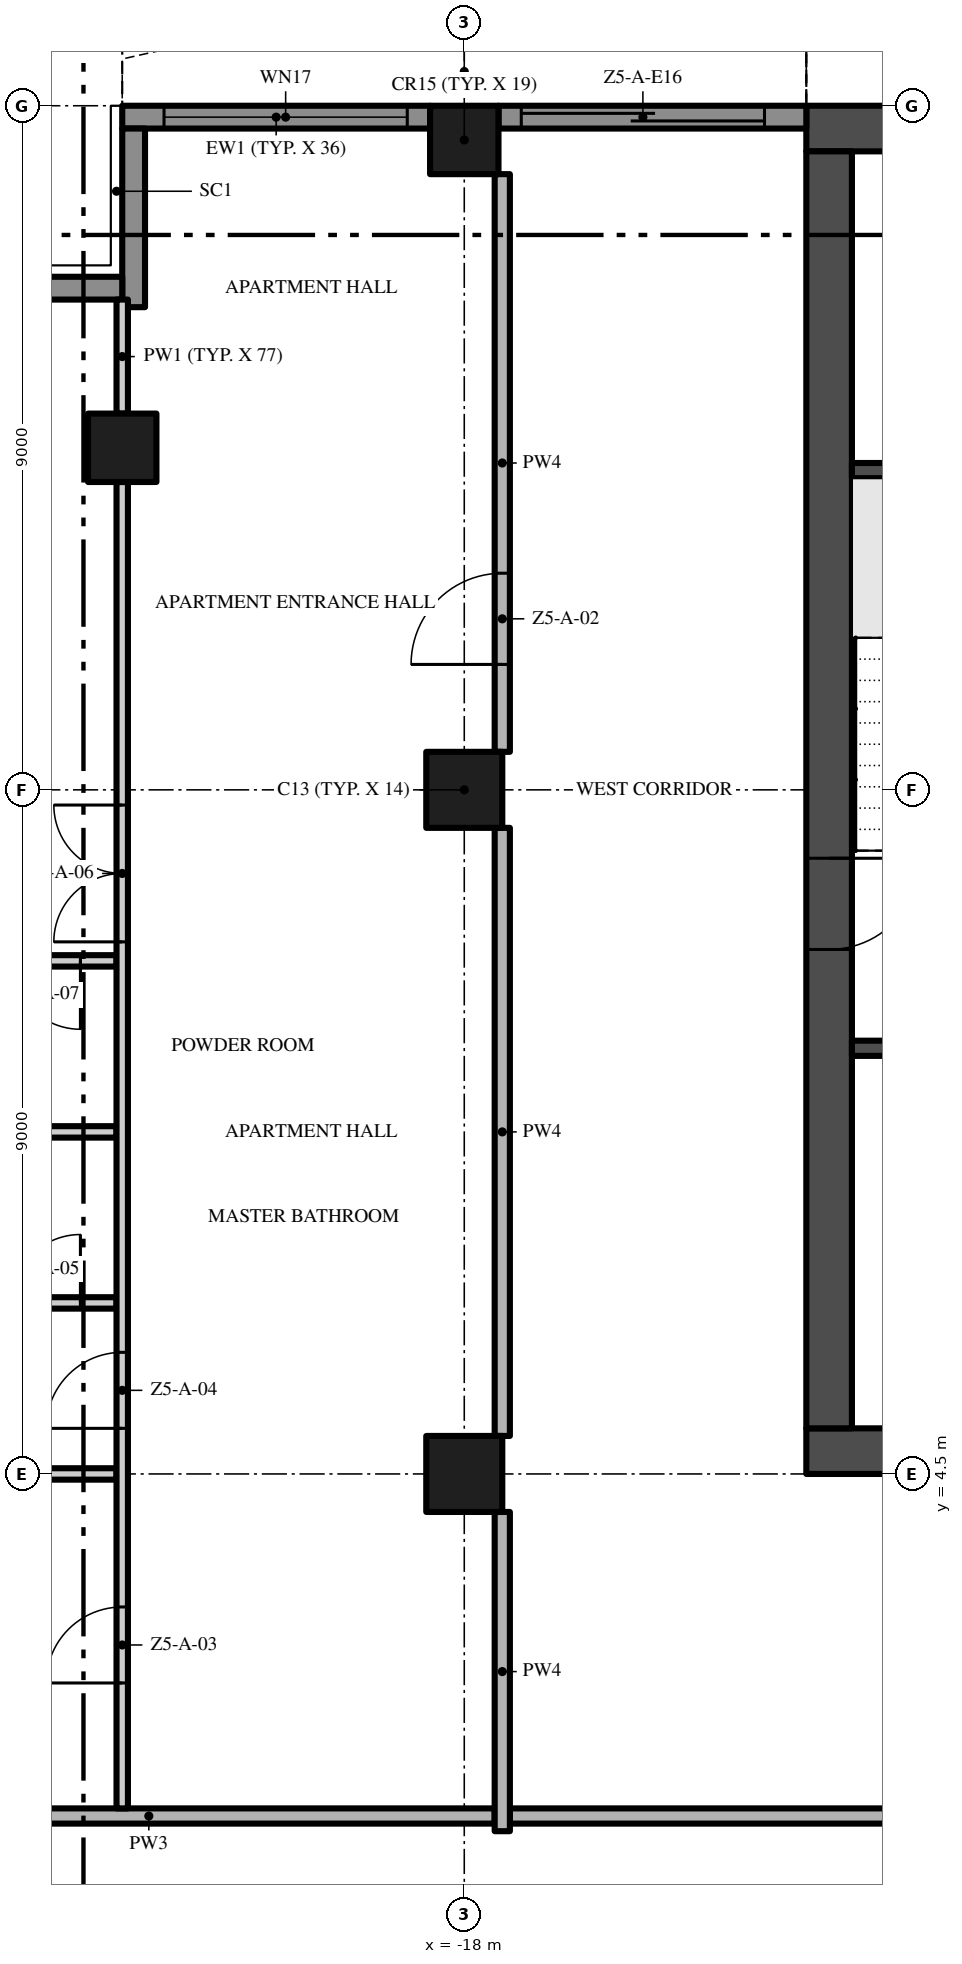
"""IFC4 building model, lengths in metres.
Left out: names, types, materials, properties, quantities, classifications, styles, units other than length and angle.
Written with IfcOpenShell. Run it as: python <this file> out.ifc"""

import sys

from ifc_helpers import new_model, si_unit, direction, frame, frame_2d, origin, origin_2d, place, context, subcontext, project, spatial, polyline, rectangle, outline, extrude, element, fill, save


model = new_model("IFC4")
c1 = context("Model", 3, precision=1e-05, world=origin(), true_north=direction((0.0, 1.0)))
c2 = subcontext(c1, "Body", "Model", "MODEL_VIEW")
j1 = project(units=[si_unit("LENGTHUNIT", "METRE"), si_unit("PLANEANGLEUNIT", "RADIAN")], contexts=[c1])
p1 = place(None, origin())
s1 = spatial("IfcSite", under=j1, at=p1, CompositionType="ELEMENT")
p2 = place(p1, origin())
s2 = spatial("IfcBuilding", under=s1, at=p2, CompositionType="ELEMENT")
p3 = place(p2, frame((0.0, 0.0, 246.4)))
s3 = spatial("IfcBuildingStorey", under=s2, at=p3, CompositionType="ELEMENT", Elevation=246.4)
p4 = place(p3, frame((-13.5, 4.8, -0.3), z_axis=(0.0, 0.0, 1.0), x_axis=(1.0, 0.0, 0.0)))
e1 = element("IfcWall", 1, at=p4, inside=s3, PredefinedType="SHEAR", context=c2, shape_type="SweptSolid", body=[
    extrude(rectangle(XDim=27.0, YDim=0.6, at=frame_2d((13.5, 0.0))), origin(), (0.0, 0.0, 1.0), 3.8),
])
p5 = place(p4, frame((12.0, 0.0, 0.3)))
e2 = element("IfcOpeningElement", 2, at=p5, cuts=e1, PredefinedType="OPENING", context=c2, shape_type="SweptSolid", body=[
    extrude(rectangle(XDim=3.0, YDim=2.4, at=frame_2d((1.5, 1.2))), frame((0.0, 0.31, 0.0), z_axis=(0.0, -1.0, 0.0), x_axis=(1.0, 0.0, 0.0)), (0.0, 0.0, 1.0), 0.62),
])
p6 = place(p4, frame((4.9, 0.0, 0.3)))
e3 = element("IfcOpeningElement", 3, at=p6, cuts=e1, PredefinedType="OPENING", context=c2, shape_type="SweptSolid", body=[
    extrude(rectangle(XDim=1.2, YDim=2.2, at=frame_2d((0.6, 1.1))), frame((0.0, 0.31, 0.0), z_axis=(0.0, -1.0, 0.0), x_axis=(1.0, 0.0, 0.0)), (0.0, 0.0, 1.0), 0.62),
])
p7 = place(p4, frame((20.75, 0.0, 0.3)))
e4 = element("IfcOpeningElement", 4, at=p7, cuts=e1, PredefinedType="OPENING", context=c2, shape_type="SweptSolid", body=[
    extrude(rectangle(XDim=1.5, YDim=2.2, at=frame_2d((0.75, 1.1))), frame((0.0, 0.31, 0.0), z_axis=(0.0, -1.0, 0.0), x_axis=(1.0, 0.0, 0.0)), (0.0, 0.0, 1.0), 0.62),
])
p8 = place(p4, frame((17.4, 0.0, 0.3)))
e5 = element("IfcOpeningElement", 5, at=p8, cuts=e1, PredefinedType="OPENING", context=c2, shape_type="SweptSolid", body=[
    extrude(rectangle(XDim=1.2, YDim=2.2, at=frame_2d((0.6, 1.1))), frame((0.0, 0.31, 0.0), z_axis=(0.0, -1.0, 0.0), x_axis=(1.0, 0.0, 0.0)), (0.0, 0.0, 1.0), 0.62),
])
p9 = place(p3, frame((13.5, 22.2, -0.3), z_axis=(0.0, 0.0, 1.0), x_axis=(-1.0, 0.0, 0.0)))
e6 = element("IfcWall", 6, at=p9, inside=s3, PredefinedType="SHEAR", context=c2, shape_type="SweptSolid", body=[
    extrude(rectangle(XDim=27.0, YDim=0.6, at=frame_2d((13.5, 0.0))), origin(), (0.0, 0.0, 1.0), 3.8),
])
p10 = place(p3, frame((-13.2, 21.9, -0.3), z_axis=(0.0, 0.0, 1.0), x_axis=(0.0, -1.0, 0.0)))
e7 = element("IfcWall", 7, at=p10, inside=s3, PredefinedType="SHEAR", context=c2, shape_type="SweptSolid", body=[
    extrude(rectangle(XDim=16.8, YDim=0.6, at=frame_2d((8.4, 0.0))), origin(), (0.0, 0.0, 1.0), 3.8),
])
p11 = place(p10, frame((9.3, 0.0, 0.3)))
e8 = element("IfcOpeningElement", 8, at=p11, cuts=e7, PredefinedType="OPENING", context=c2, shape_type="SweptSolid", body=[
    extrude(rectangle(XDim=1.2, YDim=2.2, at=frame_2d((0.6, 1.1))), frame((0.0, 0.31, 0.0), z_axis=(0.0, -1.0, 0.0), x_axis=(1.0, 0.0, 0.0)), (0.0, 0.0, 1.0), 0.62),
])
p12 = place(p3, frame((-18.0, 13.5, 0.0), z_axis=(0.0, 0.0, 1.0), x_axis=(1.0, 0.0, 0.0)))
e9 = element("IfcColumn", 9, at=p12, inside=s3, PredefinedType="COLUMN", context=c2, shape_type="SweptSolid", body=[
    extrude(rectangle(XDim=1.0, YDim=1.0, at=origin_2d()), origin(), (0.0, 0.0, 1.0), 3.5),
])
p13 = place(p3, frame((-18.0, 22.05, 0.0), z_axis=(0.0, 0.0, 1.0), x_axis=(1.0, 0.0, 0.0)))
e10 = element("IfcColumn", 10, at=p13, inside=s3, PredefinedType="COLUMN", context=c2, shape_type="SweptSolid", body=[
    extrude(rectangle(XDim=0.9, YDim=0.9, at=origin_2d()), origin(), (0.0, 0.0, 1.0), 3.5),
])
p14 = place(p3, frame((-18.0, 4.5, 0.0), z_axis=(0.0, 0.0, 1.0), x_axis=(1.0, 0.0, 0.0)))
e11 = element("IfcColumn", 11, at=p14, inside=s3, PredefinedType="COLUMN", context=c2, shape_type="SweptSolid", body=[
    extrude(rectangle(XDim=1.0, YDim=1.0, at=origin_2d()), origin(), (0.0, 0.0, 1.0), 3.5),
])
p15 = place(p3, frame((-22.5, 18.0, 0.0), z_axis=(0.0, 0.0, 1.0), x_axis=(1.0, 0.0, 0.0)))
e12 = element("IfcColumn", 12, at=p15, inside=s3, PredefinedType="COLUMN", context=c2, shape_type="SweptSolid", body=[
    extrude(rectangle(XDim=0.9, YDim=0.9, at=origin_2d()), origin(), (0.0, 0.0, 1.0), 3.5),
])
p16 = place(p3, frame((-17.55, 22.35, 0.0), z_axis=(0.0, 0.0, 1.0), x_axis=(1.0, 0.0, 0.0)))
e13 = element("IfcWall", 13, at=p16, inside=s3, PredefinedType="SOLIDWALL", context=c2, shape_type="SweptSolid", body=[
    extrude(rectangle(XDim=4.05, YDim=0.3, at=frame_2d((2.025, 0.0))), origin(), (0.0, 0.0, 1.0), 3.5),
])
p17 = place(p16, frame((0.3, 0.0, 0.0)))
e14 = element("IfcOpeningElement", 14, at=p17, cuts=e13, PredefinedType="OPENING", context=c2, shape_type="SweptSolid", body=[
    extrude(rectangle(XDim=3.2, YDim=2.4, at=frame_2d((1.6, 1.2))), frame((0.0, 0.16, 0.0), z_axis=(0.0, -1.0, 0.0), x_axis=(1.0, 0.0, 0.0)), (0.0, 0.0, 1.0), 0.32),
])
p18 = place(p3, frame((-22.5, 22.35, 0.0), z_axis=(0.0, 0.0, 1.0), x_axis=(1.0, 0.0, 0.0)))
e15 = element("IfcWall", 15, at=p18, inside=s3, PredefinedType="SOLIDWALL", context=c2, shape_type="SweptSolid", body=[
    extrude(rectangle(XDim=4.05, YDim=0.3, at=frame_2d((2.025, 0.0))), origin(), (0.0, 0.0, 1.0), 3.5),
])
p19 = place(p18, frame((0.55, 0.0, 0.45)))
e16 = element("IfcOpeningElement", 16, at=p19, cuts=e15, PredefinedType="OPENING", context=c2, shape_type="SweptSolid", body=[
    extrude(rectangle(XDim=3.2, YDim=2.65, at=frame_2d((1.6, 1.325))), frame((0.0, 0.16, 0.0), z_axis=(0.0, -1.0, 0.0), x_axis=(1.0, 0.0, 0.0)), (0.0, 0.0, 1.0), 0.32),
])
p20 = place(p3, frame((-22.35, 19.85, 0.0), z_axis=(0.0, 0.0, 1.0), x_axis=(0.0, 1.0, 0.0)))
e17 = element("IfcWall", 17, at=p20, inside=s3, PredefinedType="SOLIDWALL", context=c2, shape_type="SweptSolid", body=[
    extrude(rectangle(XDim=2.35, YDim=0.3, at=frame_2d((1.175, 0.0))), origin(), (0.0, 0.0, 1.0), 3.5),
])
p21 = place(p3, frame((-24.75, 20.1, 0.0), z_axis=(0.0, 0.0, 1.0), x_axis=(1.0, 0.0, 0.0)))
e18 = element("IfcWall", 18, at=p21, inside=s3, PredefinedType="SOLIDWALL", context=c2, shape_type="SweptSolid", body=[
    extrude(rectangle(XDim=2.25, YDim=0.3, at=frame_2d((1.125, 0.0))), origin(), (0.0, 0.0, 1.0), 3.5),
])
p22 = place(p3, origin())
e19 = element("IfcWall", 19, at=p22, inside=s3, PredefinedType="USERDEFINED", context=c2, shape_type="SweptSolid", body=[
    extrude(outline(polyline([(-13.5, 25.149), (-15.0, 25.485), (-15.375, 25.5), (-16.5, 25.369), (-18.0, 24.845), (-19.5, 24.112), (-21.0, 23.451), (-22.5, 23.115), (-22.445, 22.871), (-20.921, 23.213), (-19.395, 23.885), (-17.904, 24.614), (-16.444, 25.124), (-15.365, 25.249), (-15.033, 25.236), (-13.555, 24.905), (-13.5, 25.149)])), origin(), (0.0, 0.0, 1.0), 0.9),
])
for number, where, z_axis, x_axis in (
    (20, (-12.9, 10.1, 0.0), (0.0, 0.0, 1.0), (1.0, 0.0, 0.0)),
    (21, (-12.9, 17.7, 0.0), (0.0, 0.0, 1.0), (1.0, 0.0, 0.0)),
):
    element("IfcWall", number, at=place(p3, frame(where, z_axis=z_axis, x_axis=x_axis)), inside=s3, PredefinedType="SHEAR", context=c2, shape_type="SweptSolid", body=[
        extrude(rectangle(XDim=3.25, YDim=0.2, at=frame_2d((1.625, 0.0))), origin(), (0.0, 0.0, 1.0), 3.5),
    ])
p23 = place(p3, frame((17.4, 0.0, 0.0), z_axis=(0.0, 0.0, 1.0), x_axis=(-1.0, 0.0, 0.0)))
e22 = element("IfcWall", 22, at=p23, inside=s3, PredefinedType="PARTITIONING", context=c2, shape_type="SweptSolid", body=[
    extrude(rectangle(XDim=34.8, YDim=0.2, at=frame_2d((17.4, 0.0))), origin(), (0.0, 0.0, 1.0), 3.5),
])
p24 = place(p23, frame((25.65, 0.0, 0.0)))
e23 = element("IfcOpeningElement", 23, at=p24, cuts=e22, PredefinedType="OPENING", context=c2, shape_type="SweptSolid", body=[
    extrude(rectangle(XDim=1.5, YDim=2.4, at=frame_2d((0.75, 1.2))), frame((0.0, 0.11, 0.0), z_axis=(0.0, -1.0, 0.0), x_axis=(1.0, 0.0, 0.0)), (0.0, 0.0, 1.0), 0.22),
])
p25 = place(p23, frame((7.65, 0.0, 0.0)))
e24 = element("IfcOpeningElement", 24, at=p25, cuts=e22, PredefinedType="OPENING", context=c2, shape_type="SweptSolid", body=[
    extrude(rectangle(XDim=1.5, YDim=2.4, at=frame_2d((0.75, 1.2))), frame((0.0, 0.11, 0.0), z_axis=(0.0, -1.0, 0.0), x_axis=(1.0, 0.0, 0.0)), (0.0, 0.0, 1.0), 0.22),
])
p26 = place(p3, frame((-26.7, 0.0, 0.0), z_axis=(0.0, 0.0, 1.0), x_axis=(1.0, 0.0, 0.0)))
e25 = element("IfcWall", 25, at=p26, inside=s3, PredefinedType="PARTITIONING", context=c2, shape_type="SweptSolid", body=[
    extrude(rectangle(XDim=9.1, YDim=0.2, at=frame_2d((4.55, 0.0))), origin(), (0.0, 0.0, 1.0), 3.5),
])
p27 = place(p3, frame((-26.1, 4.5, 0.0), z_axis=(0.0, 0.0, 1.0), x_axis=(1.0, 0.0, 0.0)))
e26 = element("IfcWall", 26, at=p27, inside=s3, PredefinedType="PARTITIONING", context=c2, shape_type="SweptSolid", body=[
    extrude(rectangle(XDim=3.525, YDim=0.15, at=frame_2d((1.762, 0.0))), origin(), (0.0, 0.0, 1.0), 3.5),
])
p28 = place(p3, frame((-24.45, 6.75, 0.0), z_axis=(0.0, 0.0, 1.0), x_axis=(1.0, 0.0, 0.0)))
e27 = element("IfcWall", 27, at=p28, inside=s3, PredefinedType="PARTITIONING", context=c2, shape_type="SweptSolid", body=[
    extrude(rectangle(XDim=1.875, YDim=0.15, at=frame_2d((0.938, 0.0))), origin(), (0.0, 0.0, 1.0), 3.5),
])
p29 = place(p28, frame((0.5, 0.0, 0.0)))
e28 = element("IfcOpeningElement", 28, at=p29, cuts=e27, PredefinedType="OPENING", context=c2, shape_type="SweptSolid", body=[
    extrude(rectangle(XDim=0.9, YDim=2.1, at=frame_2d((0.45, 1.05))), frame((0.0, 0.085, 0.0), z_axis=(0.0, -1.0, 0.0), x_axis=(1.0, 0.0, 0.0)), (0.0, 0.0, 1.0), 0.17),
])
p30 = place(p3, frame((-24.45, 9.0, 0.0), z_axis=(0.0, 0.0, 1.0), x_axis=(1.0, 0.0, 0.0)))
e29 = element("IfcWall", 29, at=p30, inside=s3, PredefinedType="PARTITIONING", context=c2, shape_type="SweptSolid", body=[
    extrude(rectangle(XDim=1.875, YDim=0.15, at=frame_2d((0.938, 0.0))), origin(), (0.0, 0.0, 1.0), 3.5),
])
p31 = place(p3, frame((-22.575, 11.25, 0.0), z_axis=(0.0, 0.0, 1.0), x_axis=(-1.0, 0.0, 0.0)))
e30 = element("IfcWall", 30, at=p31, inside=s3, PredefinedType="PARTITIONING", context=c2, shape_type="SweptSolid", body=[
    extrude(rectangle(XDim=1.875, YDim=0.15, at=frame_2d((0.938, 0.0))), origin(), (0.0, 0.0, 1.0), 3.5),
])
p32 = place(p31, frame((0.475, 0.0, 0.0)))
e31 = element("IfcOpeningElement", 31, at=p32, cuts=e30, PredefinedType="OPENING", context=c2, shape_type="SweptSolid", body=[
    extrude(rectangle(XDim=0.9, YDim=2.1, at=frame_2d((0.45, 1.05))), frame((0.0, 0.085, 0.0), z_axis=(0.0, -1.0, 0.0), x_axis=(1.0, 0.0, 0.0)), (0.0, 0.0, 1.0), 0.17),
])
p33 = place(p3, frame((-22.5, 0.1, 0.0), z_axis=(0.0, 0.0, 1.0), x_axis=(0.0, 1.0, 0.0)))
e32 = element("IfcWall", 32, at=p33, inside=s3, PredefinedType="PARTITIONING", context=c2, shape_type="SweptSolid", body=[
    extrude(rectangle(XDim=17.45, YDim=0.15, at=frame_2d((8.725, 0.0))), origin(), (0.0, 0.0, 1.0), 3.5),
])
p34 = place(p33, frame((1.65, 0.0, 0.0)))
e33 = element("IfcOpeningElement", 33, at=p34, cuts=e32, PredefinedType="OPENING", context=c2, shape_type="SweptSolid", body=[
    extrude(rectangle(XDim=1.0, YDim=2.4, at=frame_2d((0.5, 1.2))), frame((0.0, 0.085, 0.0), z_axis=(0.0, -1.0, 0.0), x_axis=(1.0, 0.0, 0.0)), (0.0, 0.0, 1.0), 0.17),
])
p35 = place(p33, frame((5.0, 0.0, 0.0)))
e34 = element("IfcOpeningElement", 34, at=p35, cuts=e32, PredefinedType="OPENING", context=c2, shape_type="SweptSolid", body=[
    extrude(rectangle(XDim=1.0, YDim=2.4, at=frame_2d((0.5, 1.2))), frame((0.0, 0.085, 0.0), z_axis=(0.0, -1.0, 0.0), x_axis=(1.0, 0.0, 0.0)), (0.0, 0.0, 1.0), 0.17),
])
p36 = place(p33, frame((11.4, 0.0, 0.0)))
e35 = element("IfcOpeningElement", 35, at=p36, cuts=e32, PredefinedType="OPENING", context=c2, shape_type="SweptSolid", body=[
    extrude(rectangle(XDim=1.8, YDim=2.4, at=frame_2d((0.9, 1.2))), frame((0.0, 0.085, 0.0), z_axis=(0.0, -1.0, 0.0), x_axis=(1.0, 0.0, 0.0)), (0.0, 0.0, 1.0), 0.17),
])
p37 = place(p3, frame((-22.5, 18.45, 0.0), z_axis=(0.0, 0.0, 1.0), x_axis=(0.0, 1.0, 0.0)))
e36 = element("IfcWall", 36, at=p37, inside=s3, PredefinedType="PARTITIONING", context=c2, shape_type="SweptSolid", body=[
    extrude(rectangle(XDim=1.5, YDim=0.15, at=frame_2d((0.75, 0.0))), origin(), (0.0, 0.0, 1.0), 3.5),
])
p38 = place(p3, frame((-17.5, -0.2, 0.0), z_axis=(0.0, 0.0, 1.0), x_axis=(0.0, 1.0, 0.0)))
e37 = element("IfcWall", 37, at=p38, inside=s3, PredefinedType="PARTITIONING", context=c2, shape_type="SweptSolid", body=[
    extrude(rectangle(XDim=4.2, YDim=0.2, at=frame_2d((2.1, 0.0))), origin(), (0.0, 0.0, 1.0), 3.5),
])
p39 = place(p3, frame((-17.5, 5.0, 0.0), z_axis=(0.0, 0.0, 1.0), x_axis=(0.0, 1.0, 0.0)))
e38 = element("IfcWall", 38, at=p39, inside=s3, PredefinedType="PARTITIONING", context=c2, shape_type="SweptSolid", body=[
    extrude(rectangle(XDim=8.0, YDim=0.2, at=frame_2d((4.0, 0.0))), origin(), (0.0, 0.0, 1.0), 3.5),
])
p40 = place(p3, frame((-17.5, 14.0, 0.0), z_axis=(0.0, 0.0, 1.0), x_axis=(0.0, 1.0, 0.0)))
e39 = element("IfcWall", 39, at=p40, inside=s3, PredefinedType="PARTITIONING", context=c2, shape_type="SweptSolid", body=[
    extrude(rectangle(XDim=7.6, YDim=0.2, at=frame_2d((3.8, 0.0))), origin(), (0.0, 0.0, 1.0), 3.5),
])
p41 = place(p40, frame((1.15, 0.0, 0.0)))
e40 = element("IfcOpeningElement", 40, at=p41, cuts=e39, PredefinedType="OPENING", context=c2, shape_type="SweptSolid", body=[
    extrude(rectangle(XDim=1.2, YDim=2.4, at=frame_2d((0.6, 1.2))), frame((0.0, 0.11, 0.0), z_axis=(0.0, -1.0, 0.0), x_axis=(1.0, 0.0, 0.0)), (0.0, 0.0, 1.0), 0.22),
])
p42 = place(p17, origin())
e41 = element("IfcDoor", 41, at=p42, inside=s3, OperationType="SINGLE_SWING_LEFT", PredefinedType="DOOR", context=c2, shape_type="SweptSolid", body=[
    extrude(rectangle(XDim=3.2, YDim=2.4, at=frame_2d((1.6, 1.2))), frame((0.0, 0.025, 0.0), z_axis=(0.0, -1.0, 0.0), x_axis=(1.0, 0.0, 0.0)), (0.0, 0.0, 1.0), 0.05),
])
fill(e14, e41)
p43 = place(p19, origin())
e42 = element("IfcWindow", 42, at=p43, inside=s3, PartitioningType="SINGLE_PANEL", PredefinedType="WINDOW", context=c2, shape_type="SweptSolid", body=[
    extrude(rectangle(XDim=3.2, YDim=2.65, at=frame_2d((1.6, 1.325))), frame((0.0, 0.03, 0.0), z_axis=(0.0, -1.0, 0.0), x_axis=(1.0, 0.0, 0.0)), (0.0, 0.0, 1.0), 0.06),
])
fill(e16, e42)
p44 = place(p11, frame((1.2, 0.0, 0.0), z_axis=(0.0, 0.0, 1.0), x_axis=(-1.0, 0.0, 0.0)))
e43 = element("IfcDoor", 43, at=p44, inside=s3, OperationType="SINGLE_SWING_RIGHT", PredefinedType="DOOR", context=c2, shape_type="SweptSolid", body=[
    extrude(rectangle(XDim=1.2, YDim=2.2, at=frame_2d((0.6, 1.1))), frame((0.0, 0.025, 0.0), z_axis=(0.0, -1.0, 0.0), x_axis=(1.0, 0.0, 0.0)), (0.0, 0.0, 1.0), 0.05),
])
fill(e8, e43)
p45 = place(p41, origin())
e44 = element("IfcDoor", 44, at=p45, inside=s3, OperationType="SINGLE_SWING_LEFT", PredefinedType="DOOR", context=c2, shape_type="SweptSolid", body=[
    extrude(rectangle(XDim=1.2, YDim=2.4, at=frame_2d((0.6, 1.2))), frame((0.0, 0.025, 0.0), z_axis=(0.0, -1.0, 0.0), x_axis=(1.0, 0.0, 0.0)), (0.0, 0.0, 1.0), 0.05),
])
fill(e40, e44)
p46 = place(p34, origin())
e45 = element("IfcDoor", 45, at=p46, inside=s3, OperationType="SINGLE_SWING_LEFT", PredefinedType="DOOR", context=c2, shape_type="SweptSolid", body=[
    extrude(rectangle(XDim=1.0, YDim=2.4, at=frame_2d((0.5, 1.2))), frame((0.0, 0.025, 0.0), z_axis=(0.0, -1.0, 0.0), x_axis=(1.0, 0.0, 0.0)), (0.0, 0.0, 1.0), 0.05),
])
fill(e33, e45)
p47 = place(p35, origin())
e46 = element("IfcDoor", 46, at=p47, inside=s3, OperationType="SINGLE_SWING_LEFT", PredefinedType="DOOR", context=c2, shape_type="SweptSolid", body=[
    extrude(rectangle(XDim=1.0, YDim=2.4, at=frame_2d((0.5, 1.2))), frame((0.0, 0.025, 0.0), z_axis=(0.0, -1.0, 0.0), x_axis=(1.0, 0.0, 0.0)), (0.0, 0.0, 1.0), 0.05),
])
fill(e34, e46)
p48 = place(p29, origin())
e47 = element("IfcDoor", 47, at=p48, inside=s3, OperationType="SINGLE_SWING_RIGHT", PredefinedType="DOOR", context=c2, shape_type="SweptSolid", body=[
    extrude(rectangle(XDim=0.9, YDim=2.1, at=frame_2d((0.45, 1.05))), frame((0.0, 0.025, 0.0), z_axis=(0.0, -1.0, 0.0), x_axis=(1.0, 0.0, 0.0)), (0.0, 0.0, 1.0), 0.05),
])
fill(e28, e47)
p49 = place(p36, origin())
e48 = element("IfcDoor", 48, at=p49, inside=s3, OperationType="DOUBLE_DOOR_SINGLE_SWING", PredefinedType="DOOR", context=c2, shape_type="SweptSolid", body=[
    extrude(rectangle(XDim=1.8, YDim=2.4, at=frame_2d((0.9, 1.2))), frame((0.0, 0.025, 0.0), z_axis=(0.0, -1.0, 0.0), x_axis=(1.0, 0.0, 0.0)), (0.0, 0.0, 1.0), 0.05),
])
fill(e35, e48)
p50 = place(p32, origin())
e49 = element("IfcDoor", 49, at=p50, inside=s3, OperationType="SINGLE_SWING_LEFT", PredefinedType="DOOR", context=c2, shape_type="SweptSolid", body=[
    extrude(rectangle(XDim=0.9, YDim=2.1, at=frame_2d((0.45, 1.05))), frame((0.0, 0.025, 0.0), z_axis=(0.0, -1.0, 0.0), x_axis=(1.0, 0.0, 0.0)), (0.0, 0.0, 1.0), 0.05),
])
fill(e31, e49)
save(model, sys.argv[1])
